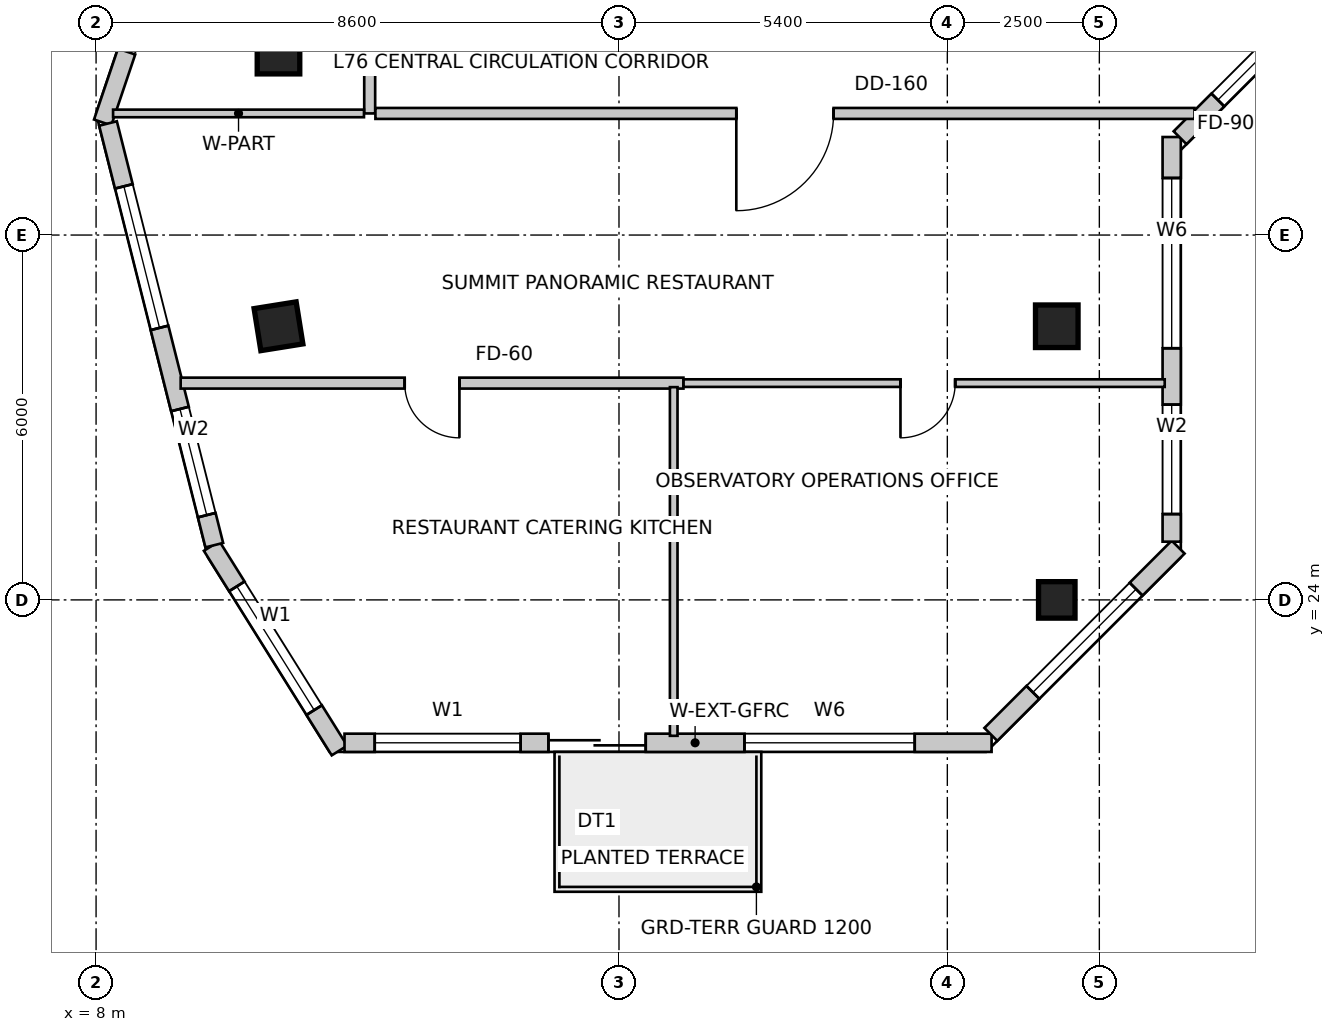
"""IFC4 building model, lengths in metres.
Left out: names, types, materials, properties, quantities, classifications, styles, units other than length and angle.
Written with IfcOpenShell. Run it as: python <this file> out.ifc"""

import sys

from ifc_helpers import new_model, si_unit, direction, frame, frame_2d, origin, origin_2d, place, context, subcontext, project, spatial, rectangle, extrude, source, transform, mapped, element, fill, save


model = new_model("IFC4")
c1 = context("Model", 3, precision=1e-05, world=origin(), true_north=direction((0.0, 1.0)))
c2 = subcontext(c1, "Body", "Model", "MODEL_VIEW")
j1 = project(units=[si_unit("LENGTHUNIT", "METRE"), si_unit("PLANEANGLEUNIT", "RADIAN")], contexts=[c1])
p1 = place(None, origin())
s1 = spatial("IfcSite", under=j1, at=p1, CompositionType="ELEMENT")
p2 = place(p1, origin())
s2 = spatial("IfcBuilding", under=s1, at=p2, CompositionType="ELEMENT")
p3 = place(p2, frame((0.0, 0.0, 296.5)))
s3 = spatial("IfcBuildingStorey", under=s2, at=p3, CompositionType="ELEMENT", Elevation=296.5)
m1 = source(origin(), c2, "Body", "SweptSolid", [
    extrude(rectangle(XDim=0.7, YDim=0.7, at=origin_2d()), origin(), (0.0, 0.0, 1.0), 4.0),
])
for number, where, z_axis, x_axis in (
    (1, (11.0, 33.0, 0.0), (0.0, 0.0, 1.0), (1.0, 0.0, 0.0)),
    (2, (11.0, 28.5, 0.0), (0.0, 0.0, 1.0), (0.158, -0.987, 0.0)),
    (3, (23.8, 28.5, 0.0), (0.0, 0.0, 1.0), (1.0, 0.0, 0.0)),
):
    element("IfcColumn", number, at=place(p3, frame(where, z_axis=z_axis, x_axis=x_axis)), inside=s3, PredefinedType="COLUMN", context=c2, shape_type="MappedRepresentation", body=[
        mapped(m1, transform((0.0, 0.0, 0.0), scale=1.0)),
    ])
m2 = source(origin(), c2, "Body", "SweptSolid", [
    extrude(rectangle(XDim=0.6, YDim=0.6, at=origin_2d()), origin(), (0.0, 0.0, 1.0), 4.0),
])
p4 = place(p3, frame((23.8, 24.0, 0.0), z_axis=(0.0, 0.0, 1.0), x_axis=(1.0, 0.0, 0.0)))
e4 = element("IfcColumn", 4, at=p4, inside=s3, PredefinedType="COLUMN", context=c2, shape_type="MappedRepresentation", body=[
    mapped(m2, transform((0.0, 0.0, 0.0), scale=1.0)),
])
p5 = place(p3, frame((9.9, 24.887, 0.0), z_axis=(0.0, 0.0, 1.0), x_axis=(0.530004471907, -0.84799484654, 0.0)))
e5 = element("IfcWall", 5, at=p5, inside=s3, PredefinedType="SOLIDWALL", context=c2, shape_type="SweptSolid", body=[
    extrude(rectangle(XDim=3.967, YDim=0.3, at=frame_2d((1.983, 0.0))), origin(), (0.0, 0.0, 1.0), 3.75),
])
m3 = source(origin(), c2, "Body", "SweptSolid", [
    extrude(rectangle(XDim=2.4, YDim=2.2, at=frame_2d((1.2, 1.1))), frame((0.0, 0.16, 0.0), z_axis=(0.0, -1.0, 0.0), x_axis=(1.0, 0.0, 0.0)), (0.0, 0.0, 1.0), 0.32),
])
p6 = place(p5, frame((0.783, 0.0, 0.85)))
e6 = element("IfcOpeningElement", 6, at=p6, cuts=e5, PredefinedType="OPENING", context=c2, shape_type="MappedRepresentation", body=[
    mapped(m3, transform((0.0, 0.0, 0.0), scale=1.0)),
])
p7 = place(p3, frame((12.086, 21.65, 0.0), z_axis=(0.0, 0.0, 1.0), x_axis=(1.0, 0.0, 0.0)))
e7 = element("IfcWall", 7, at=p7, inside=s3, PredefinedType="SOLIDWALL", context=c2, shape_type="SweptSolid", body=[
    extrude(rectangle(XDim=10.642, YDim=0.3, at=frame_2d((5.321, 0.0))), origin(), (0.0, 0.0, 1.0), 3.75),
])
m4 = source(origin(), c2, "Body", "SweptSolid", [
    extrude(rectangle(XDim=1.6, YDim=2.15, at=frame_2d((0.8, 1.075))), frame((0.0, 0.16, 0.0), z_axis=(0.0, -1.0, 0.0), x_axis=(1.0, 0.0, 0.0)), (0.0, 0.0, 1.0), 0.32),
])
p8 = place(p7, frame((3.354, 0.0, 0.0)))
e8 = element("IfcOpeningElement", 8, at=p8, cuts=e7, PredefinedType="OPENING", context=c2, shape_type="MappedRepresentation", body=[
    mapped(m4, transform((0.0, 0.0, 0.0), scale=1.0)),
])
p9 = place(p7, frame((0.497, 0.0, 0.85)))
e9 = element("IfcOpeningElement", 9, at=p9, cuts=e7, PredefinedType="OPENING", context=c2, shape_type="MappedRepresentation", body=[
    mapped(m3, transform((0.0, 0.0, 0.0), scale=1.0)),
])
m5 = source(origin(), c2, "Body", "SweptSolid", [
    extrude(rectangle(XDim=2.8, YDim=2.4, at=frame_2d((1.4, 1.2))), frame((0.0, 0.16, 0.0), z_axis=(0.0, -1.0, 0.0), x_axis=(1.0, 0.0, 0.0)), (0.0, 0.0, 1.0), 0.32),
])
p10 = place(p7, frame((6.578, 0.0, 0.85)))
e10 = element("IfcOpeningElement", 10, at=p10, cuts=e7, PredefinedType="OPENING", context=c2, shape_type="MappedRepresentation", body=[
    mapped(m5, transform((0.0, 0.0, 0.0), scale=1.0)),
])
p11 = place(p3, frame((22.716, 21.788, 0.0), z_axis=(0.0, 0.0, 1.0), x_axis=(0.707134803727, 0.707078757535, 0.0)))
e11 = element("IfcWall", 11, at=p11, inside=s3, PredefinedType="SOLIDWALL", context=c2, shape_type="SweptSolid", body=[
    extrude(rectangle(XDim=4.356, YDim=0.3, at=frame_2d((2.178, 0.0))), origin(), (0.0, 0.0, 1.0), 3.75),
])
p12 = place(p11, frame((0.978, 0.0, 0.85)))
e12 = element("IfcOpeningElement", 12, at=p12, cuts=e11, PredefinedType="OPENING", context=c2, shape_type="MappedRepresentation", body=[
    mapped(m3, transform((0.0, 0.0, 0.0), scale=1.0)),
])
p13 = place(p3, frame((25.69, 24.957, 0.0), z_axis=(0.0, 0.0, 1.0), x_axis=(0.0, 1.0, 0.0)))
e13 = element("IfcWall", 13, at=p13, inside=s3, PredefinedType="SOLIDWALL", context=c2, shape_type="SweptSolid", body=[
    extrude(rectangle(XDim=6.655, YDim=0.3, at=frame_2d((3.327, 0.0))), origin(), (0.0, 0.0, 1.0), 3.75),
])
m6 = source(origin(), c2, "Body", "SweptSolid", [
    extrude(rectangle(XDim=1.8, YDim=2.1, at=frame_2d((0.9, 1.05))), frame((0.0, 0.16, 0.0), z_axis=(0.0, -1.0, 0.0), x_axis=(1.0, 0.0, 0.0)), (0.0, 0.0, 1.0), 0.32),
])
p14 = place(p13, frame((0.454, 0.0, 0.85)))
e14 = element("IfcOpeningElement", 14, at=p14, cuts=e13, PredefinedType="OPENING", context=c2, shape_type="MappedRepresentation", body=[
    mapped(m6, transform((0.0, 0.0, 0.0), scale=1.0)),
])
p15 = place(p13, frame((3.181, 0.0, 0.85)))
e15 = element("IfcOpeningElement", 15, at=p15, cuts=e13, PredefinedType="OPENING", context=c2, shape_type="MappedRepresentation", body=[
    mapped(m5, transform((0.0, 0.0, 0.0), scale=1.0)),
])
p16 = place(p3, frame((25.828, 31.6, 0.0), z_axis=(0.0, 0.0, 1.0), x_axis=(0.707106781187, 0.707106781187, 0.0)))
e16 = element("IfcWall", 16, at=p16, inside=s3, PredefinedType="SOLIDWALL", context=c2, shape_type="SweptSolid", body=[
    extrude(rectangle(XDim=2.907, YDim=0.3, at=frame_2d((1.454, 0.0))), origin(), (0.0, 0.0, 1.0), 3.75),
])
m7 = source(origin(), c2, "Body", "SweptSolid", [
    extrude(rectangle(XDim=1.5, YDim=1.8, at=frame_2d((0.75, 0.9))), frame((0.0, 0.16, 0.0), z_axis=(0.0, -1.0, 0.0), x_axis=(1.0, 0.0, 0.0)), (0.0, 0.0, 1.0), 0.32),
])
p17 = place(p16, frame((0.879, 0.0, 0.85)))
e17 = element("IfcOpeningElement", 17, at=p17, cuts=e16, PredefinedType="OPENING", context=c2, shape_type="MappedRepresentation", body=[
    mapped(m7, transform((0.0, 0.0, 0.0), scale=1.0)),
])
p18 = place(p3, frame((8.502, 33.017, 0.0), z_axis=(0.0, 0.0, 1.0), x_axis=(-0.319798692732, -0.947485512357, 0.0)))
e18 = element("IfcWall", 18, at=p18, inside=s3, PredefinedType="SOLIDWALL", context=c2, shape_type="SweptSolid", body=[
    extrude(rectangle(XDim=1.23, YDim=0.3, at=frame_2d((0.615, 0.0))), origin(), (0.0, 0.0, 1.0), 3.75),
])
p19 = place(p3, frame((8.196, 31.835, 0.0), z_axis=(0.0, 0.0, 1.0), x_axis=(0.244430846523, -0.969666726906, 0.0)))
e19 = element("IfcWall", 19, at=p19, inside=s3, PredefinedType="SOLIDWALL", context=c2, shape_type="SweptSolid", body=[
    extrude(rectangle(XDim=7.152, YDim=0.3, at=frame_2d((3.576, 0.0))), origin(), (0.0, 0.0, 1.0), 3.75),
])
p20 = place(p19, frame((1.066, 0.0, 0.85)))
e20 = element("IfcOpeningElement", 20, at=p20, cuts=e19, PredefinedType="OPENING", context=c2, shape_type="MappedRepresentation", body=[
    mapped(m3, transform((0.0, 0.0, 0.0), scale=1.0)),
])
p21 = place(p19, frame((4.842, 0.0, 0.85)))
e21 = element("IfcOpeningElement", 21, at=p21, cuts=e19, PredefinedType="OPENING", context=c2, shape_type="MappedRepresentation", body=[
    mapped(m6, transform((0.0, 0.0, 0.0), scale=1.0)),
])
p22 = place(p3, frame((12.5, 32.0, 0.0), z_axis=(0.0, 0.0, 1.0), x_axis=(0.0, 1.0, 0.0)))
e22 = element("IfcWall", 22, at=p22, inside=s3, PredefinedType="PARTITIONING", context=c2, shape_type="SweptSolid", body=[
    extrude(rectangle(XDim=1.556, YDim=0.18, at=frame_2d((0.778, 0.0))), origin(), (0.0, 0.0, 1.0), 3.419),
])
p23 = place(p3, frame((26.065, 32.0, 0.0), z_axis=(0.0, 0.0, 1.0), x_axis=(-1.0, 0.0, 0.0)))
e23 = element("IfcWall", 23, at=p23, inside=s3, PredefinedType="PARTITIONING", context=c2, shape_type="SweptSolid", body=[
    extrude(rectangle(XDim=13.471, YDim=0.18, at=frame_2d((6.736, 0.0))), origin(), (0.0, 0.0, 1.0), 3.419),
])
m8 = source(origin(), c2, "Body", "SweptSolid", [
    extrude(rectangle(XDim=1.6, YDim=2.15, at=frame_2d((0.8, 1.075))), frame((0.0, 0.1, 0.0), z_axis=(0.0, -1.0, 0.0), x_axis=(1.0, 0.0, 0.0)), (0.0, 0.0, 1.0), 0.2),
])
p24 = place(p23, frame((5.936, 0.0, 0.0)))
e24 = element("IfcOpeningElement", 24, at=p24, cuts=e23, PredefinedType="OPENING", context=c2, shape_type="MappedRepresentation", body=[
    mapped(m8, transform((0.0, 0.0, 0.0), scale=1.0)),
])
p25 = place(p3, frame((12.406, 32.0, 0.0), z_axis=(0.0, 0.0, 1.0), x_axis=(-1.0, 0.0, 0.0)))
e25 = element("IfcWall", 25, at=p25, inside=s3, PredefinedType="PARTITIONING", context=c2, shape_type="SweptSolid", body=[
    extrude(rectangle(XDim=4.126, YDim=0.125, at=frame_2d((2.063, 0.0))), origin(), (0.0, 0.0, 1.0), 3.042),
])
p26 = place(p3, frame((17.66, 27.565, 0.0), z_axis=(0.0, 0.0, 1.0), x_axis=(-1.0, 0.0, 0.0)))
e26 = element("IfcWall", 26, at=p26, inside=s3, PredefinedType="PARTITIONING", context=c2, shape_type="SweptSolid", body=[
    extrude(rectangle(XDim=8.269, YDim=0.18, at=frame_2d((4.134, 0.0))), origin(), (0.0, 0.0, 1.0), 3.419),
])
m9 = source(origin(), c2, "Body", "SweptSolid", [
    extrude(rectangle(XDim=0.9, YDim=2.15, at=frame_2d((0.45, 1.075))), frame((0.0, 0.1, 0.0), z_axis=(0.0, -1.0, 0.0), x_axis=(1.0, 0.0, 0.0)), (0.0, 0.0, 1.0), 0.2),
])
p27 = place(p26, frame((3.684, 0.0, 0.0)))
e27 = element("IfcOpeningElement", 27, at=p27, cuts=e26, PredefinedType="OPENING", context=c2, shape_type="MappedRepresentation", body=[
    mapped(m9, transform((0.0, 0.0, 0.0), scale=1.0)),
])
p28 = place(p3, frame((25.575, 27.565, 0.0), z_axis=(0.0, 0.0, 1.0), x_axis=(-1.0, 0.0, 0.0)))
e28 = element("IfcWall", 28, at=p28, inside=s3, PredefinedType="PARTITIONING", context=c2, shape_type="SweptSolid", body=[
    extrude(rectangle(XDim=7.913, YDim=0.125, at=frame_2d((3.957, 0.0))), origin(), (0.0, 0.0, 1.0), 3.042),
])
m10 = source(origin(), c2, "Body", "SweptSolid", [
    extrude(rectangle(XDim=0.9, YDim=2.15, at=frame_2d((0.45, 1.075))), frame((0.0, 0.073, 0.0), z_axis=(0.0, -1.0, 0.0), x_axis=(1.0, 0.0, 0.0)), (0.0, 0.0, 1.0), 0.145),
])
p29 = place(p28, frame((3.446, 0.0, 0.0)))
e29 = element("IfcOpeningElement", 29, at=p29, cuts=e28, PredefinedType="OPENING", context=c2, shape_type="MappedRepresentation", body=[
    mapped(m10, transform((0.0, 0.0, 0.0), scale=1.0)),
])
p30 = place(p3, frame((17.5, 27.499, 0.0), z_axis=(0.0, 0.0, 1.0), x_axis=(0.0, -1.0, 0.0)))
e30 = element("IfcWall", 30, at=p30, inside=s3, PredefinedType="PARTITIONING", context=c2, shape_type="SweptSolid", body=[
    extrude(rectangle(XDim=5.734, YDim=0.125, at=frame_2d((2.867, 0.0))), origin(), (0.0, 0.0, 1.0), 3.419),
])
m11 = source(origin(), c2, "Body", "SweptSolid", [
    extrude(rectangle(XDim=2.4, YDim=2.2, at=frame_2d((1.2, 1.1))), frame((0.0, -0.015, 0.0), z_axis=(0.0, -1.0, 0.0), x_axis=(1.0, 0.0, 0.0)), (0.0, 0.0, 1.0), 0.06),
])
p31 = place(p6, origin())
e31 = element("IfcWindow", 31, at=p31, inside=s3, PartitioningType="SINGLE_PANEL", PredefinedType="WINDOW", context=c2, shape_type="MappedRepresentation", body=[
    mapped(m11, transform((0.0, 0.0, 0.0), scale=1.0)),
])
fill(e6, e31)
m12 = source(origin(), c2, "Body", "SweptSolid", [
    extrude(rectangle(XDim=1.6, YDim=2.15, at=frame_2d((0.8, 1.075))), frame((0.0, 0.025, 0.0), z_axis=(0.0, -1.0, 0.0), x_axis=(1.0, 0.0, 0.0)), (0.0, 0.0, 1.0), 0.05),
])
p32 = place(p8, origin())
e32 = element("IfcDoor", 32, at=p32, inside=s3, OperationType="DOUBLE_DOOR_SLIDING", PredefinedType="DOOR", context=c2, shape_type="MappedRepresentation", body=[
    mapped(m12, transform((0.0, 0.0, 0.0), scale=1.0)),
])
fill(e8, e32)
p33 = place(p9, origin())
e33 = element("IfcWindow", 33, at=p33, inside=s3, PartitioningType="SINGLE_PANEL", PredefinedType="WINDOW", context=c2, shape_type="MappedRepresentation", body=[
    mapped(m11, transform((0.0, 0.0, 0.0), scale=1.0)),
])
fill(e9, e33)
m13 = source(origin(), c2, "Body", "SweptSolid", [
    extrude(rectangle(XDim=2.8, YDim=2.4, at=frame_2d((1.4, 1.2))), frame((0.0, -0.015, 0.0), z_axis=(0.0, -1.0, 0.0), x_axis=(1.0, 0.0, 0.0)), (0.0, 0.0, 1.0), 0.06),
])
p34 = place(p10, origin())
e34 = element("IfcWindow", 34, at=p34, inside=s3, PartitioningType="SINGLE_PANEL", PredefinedType="WINDOW", context=c2, shape_type="MappedRepresentation", body=[
    mapped(m13, transform((0.0, 0.0, 0.0), scale=1.0)),
])
fill(e10, e34)
p35 = place(p12, origin())
e35 = element("IfcWindow", 35, at=p35, inside=s3, PartitioningType="SINGLE_PANEL", PredefinedType="WINDOW", context=c2, shape_type="MappedRepresentation", body=[
    mapped(m11, transform((0.0, 0.0, 0.0), scale=1.0)),
])
fill(e12, e35)
m14 = source(origin(), c2, "Body", "SweptSolid", [
    extrude(rectangle(XDim=1.8, YDim=2.1, at=frame_2d((0.9, 1.05))), frame((0.0, -0.015, 0.0), z_axis=(0.0, -1.0, 0.0), x_axis=(1.0, 0.0, 0.0)), (0.0, 0.0, 1.0), 0.06),
])
p36 = place(p14, origin())
e36 = element("IfcWindow", 36, at=p36, inside=s3, PartitioningType="SINGLE_PANEL", PredefinedType="WINDOW", context=c2, shape_type="MappedRepresentation", body=[
    mapped(m14, transform((0.0, 0.0, 0.0), scale=1.0)),
])
fill(e14, e36)
p37 = place(p15, origin())
e37 = element("IfcWindow", 37, at=p37, inside=s3, PartitioningType="SINGLE_PANEL", PredefinedType="WINDOW", context=c2, shape_type="MappedRepresentation", body=[
    mapped(m13, transform((0.0, 0.0, 0.0), scale=1.0)),
])
fill(e15, e37)
m15 = source(origin(), c2, "Body", "SweptSolid", [
    extrude(rectangle(XDim=1.5, YDim=1.8, at=frame_2d((0.75, 0.9))), frame((0.0, -0.015, 0.0), z_axis=(0.0, -1.0, 0.0), x_axis=(1.0, 0.0, 0.0)), (0.0, 0.0, 1.0), 0.06),
])
p38 = place(p17, origin())
e38 = element("IfcWindow", 38, at=p38, inside=s3, PartitioningType="SINGLE_PANEL", PredefinedType="WINDOW", context=c2, shape_type="MappedRepresentation", body=[
    mapped(m15, transform((0.0, 0.0, 0.0), scale=1.0)),
])
fill(e17, e38)
p39 = place(p20, origin())
e39 = element("IfcWindow", 39, at=p39, inside=s3, PartitioningType="SINGLE_PANEL", PredefinedType="WINDOW", context=c2, shape_type="MappedRepresentation", body=[
    mapped(m11, transform((0.0, 0.0, 0.0), scale=1.0)),
])
fill(e20, e39)
p40 = place(p21, origin())
e40 = element("IfcWindow", 40, at=p40, inside=s3, PartitioningType="SINGLE_PANEL", PredefinedType="WINDOW", context=c2, shape_type="MappedRepresentation", body=[
    mapped(m14, transform((0.0, 0.0, 0.0), scale=1.0)),
])
fill(e21, e40)
m16 = source(origin(), c2, "Body", "SweptSolid", [
    extrude(rectangle(XDim=1.6, YDim=2.15, at=frame_2d((0.8, 1.075))), frame((0.0, 0.025, 0.0), z_axis=(0.0, -1.0, 0.0), x_axis=(1.0, 0.0, 0.0)), (0.0, 0.0, 1.0), 0.05),
])
p41 = place(p24, origin())
e41 = element("IfcDoor", 41, at=p41, inside=s3, OperationType="SINGLE_SWING_RIGHT", PredefinedType="DOOR", context=c2, shape_type="MappedRepresentation", body=[
    mapped(m16, transform((0.0, 0.0, 0.0), scale=1.0)),
])
fill(e24, e41)
m17 = source(origin(), c2, "Body", "SweptSolid", [
    extrude(rectangle(XDim=0.9, YDim=2.15, at=frame_2d((0.45, 1.075))), frame((0.0, 0.025, 0.0), z_axis=(0.0, -1.0, 0.0), x_axis=(1.0, 0.0, 0.0)), (0.0, 0.0, 1.0), 0.05),
])
p42 = place(p27, origin())
e42 = element("IfcDoor", 42, at=p42, inside=s3, OperationType="SINGLE_SWING_LEFT", PredefinedType="DOOR", context=c2, shape_type="MappedRepresentation", body=[
    mapped(m17, transform((0.0, 0.0, 0.0), scale=1.0)),
])
fill(e27, e42)
m18 = source(origin(), c2, "Body", "SweptSolid", [
    extrude(rectangle(XDim=0.9, YDim=2.15, at=frame_2d((0.45, 1.075))), frame((0.0, 0.025, 0.0), z_axis=(0.0, -1.0, 0.0), x_axis=(1.0, 0.0, 0.0)), (0.0, 0.0, 1.0), 0.05),
])
p43 = place(p29, origin())
e43 = element("IfcDoor", 43, at=p43, inside=s3, OperationType="SINGLE_SWING_RIGHT", PredefinedType="DOOR", context=c2, shape_type="MappedRepresentation", body=[
    mapped(m18, transform((0.0, 0.0, 0.0), scale=1.0)),
])
fill(e29, e43)
save(model, sys.argv[1])
